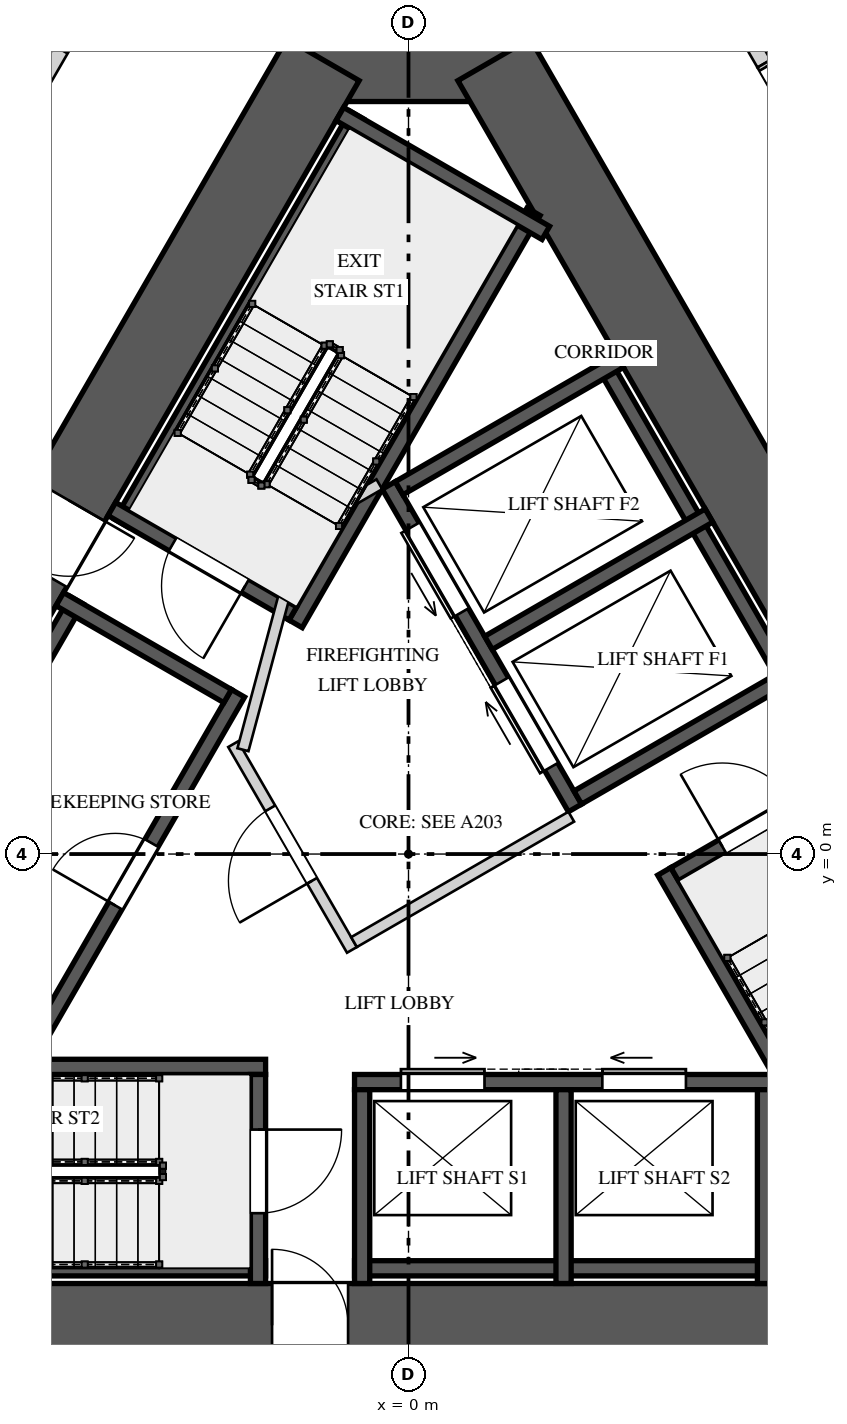
"""IFC4 building model, lengths in metres.
Left out: names, types, materials, properties, quantities, classifications, styles, units other than length and angle.
Written with IfcOpenShell. Run it as: python <this file> out.ifc"""

import sys

from ifc_helpers import new_model, si_unit, direction, frame, frame_2d, origin, place, context, subcontext, project, spatial, polyline, rectangle, outline, extrude, element, fill, save


model = new_model("IFC4")
c1 = context("Model", 3, precision=1e-05, world=origin(), true_north=direction((0.0, 1.0)))
c2 = subcontext(c1, "Body", "Model", "MODEL_VIEW")
j1 = project(units=[si_unit("LENGTHUNIT", "METRE"), si_unit("PLANEANGLEUNIT", "RADIAN")], contexts=[c1])
p1 = place(None, origin())
s1 = spatial("IfcSite", under=j1, at=p1, CompositionType="ELEMENT")
p2 = place(p1, origin())
s2 = spatial("IfcBuilding", under=s1, at=p2, CompositionType="ELEMENT")
p3 = place(p2, frame((0.0, 0.0, 10.0)))
s3 = spatial("IfcBuildingStorey", under=s2, at=p3, CompositionType="ELEMENT", Elevation=10.0)
p4 = place(p3, frame((1.443, 10.45, 0.0), z_axis=(0.0, 0.0, 1.0), x_axis=(-1.0, 0.0, 0.0)))
e1 = element("IfcWall", 1, at=p4, inside=s3, PredefinedType="SHEAR", context=c2, shape_type="SweptSolid", body=[
    extrude(rectangle(XDim=2.887, YDim=1.1, at=frame_2d((1.443, 0.0))), origin(), (0.0, 0.0, 1.0), 5.0),
])
p5 = place(p3, frame((-1.126, 10.45, 0.0), z_axis=(0.0, 0.0, 1.0), x_axis=(-0.500001757713, -0.866024388966, 0.0)))
e2 = element("IfcWall", 2, at=p5, inside=s3, PredefinedType="SHEAR", context=c2, shape_type="SweptSolid", body=[
    extrude(rectangle(XDim=16.974, YDim=1.1, at=frame_2d((8.487, 0.0))), origin(), (0.0, 0.0, 1.0), 5.0),
])
p6 = place(p5, frame((6.692, 0.0, 0.0)))
e3 = element("IfcOpeningElement", 3, at=p6, cuts=e2, PredefinedType="OPENING", context=c2, shape_type="SweptSolid", body=[
    extrude(rectangle(XDim=1.0, YDim=2.4, at=frame_2d((0.5, 1.2))), frame((0.0, 0.56, 0.0), z_axis=(0.0, -1.0, 0.0), x_axis=(1.0, 0.0, 0.0)), (0.0, 0.0, 1.0), 1.12),
])
p7 = place(p5, frame((14.397, 0.0, 0.0)))
e4 = element("IfcOpeningElement", 4, at=p7, cuts=e2, PredefinedType="OPENING", context=c2, shape_type="SweptSolid", body=[
    extrude(rectangle(XDim=0.8, YDim=2.1, at=frame_2d((0.4, 1.05))), frame((0.0, 0.56, 0.0), z_axis=(0.0, -1.0, 0.0), x_axis=(1.0, 0.0, 0.0)), (0.0, 0.0, 1.0), 1.12),
])
p8 = place(p3, frame((-8.487, -6.2, 0.0), z_axis=(0.0, 0.0, 1.0), x_axis=(1.0, 0.0, 0.0)))
e5 = element("IfcWall", 5, at=p8, inside=s3, PredefinedType="SHEAR", context=c2, shape_type="SweptSolid", body=[
    extrude(rectangle(XDim=16.974, YDim=1.1, at=frame_2d((8.487, 0.0))), origin(), (0.0, 0.0, 1.0), 5.0),
])
p9 = place(p8, frame((6.692, 0.0, 0.0)))
e6 = element("IfcOpeningElement", 6, at=p9, cuts=e5, PredefinedType="OPENING", context=c2, shape_type="SweptSolid", body=[
    extrude(rectangle(XDim=1.0, YDim=2.4, at=frame_2d((0.5, 1.2))), frame((0.0, 0.56, 0.0), z_axis=(0.0, -1.0, 0.0), x_axis=(1.0, 0.0, 0.0)), (0.0, 0.0, 1.0), 1.12),
])
p10 = place(p3, frame((9.613, -4.25, 0.0), z_axis=(0.0, 0.0, 1.0), x_axis=(-0.500001757713, 0.866024388966, 0.0)))
e7 = element("IfcWall", 7, at=p10, inside=s3, PredefinedType="SHEAR", context=c2, shape_type="SweptSolid", body=[
    extrude(rectangle(XDim=16.974, YDim=1.1, at=frame_2d((8.487, 0.0))), origin(), (0.0, 0.0, 1.0), 5.0),
])
p11 = place(p10, frame((6.762, 0.0, 0.0)))
e8 = element("IfcOpeningElement", 8, at=p11, cuts=e7, PredefinedType="OPENING", context=c2, shape_type="SweptSolid", body=[
    extrude(rectangle(XDim=1.0, YDim=2.4, at=frame_2d((0.5, 1.2))), frame((0.0, 0.56, 0.0), z_axis=(0.0, -1.0, 0.0), x_axis=(1.0, 0.0, 0.0)), (0.0, 0.0, 1.0), 1.12),
])
p12 = place(p3, frame((-0.68, 9.722, 0.0), z_axis=(0.0, 0.0, 1.0), x_axis=(-0.49998037582, -0.866036733513, 0.0)))
e9 = element("IfcWall", 9, at=p12, inside=s3, PredefinedType="SOLIDWALL", context=c2, shape_type="SweptSolid", body=[
    extrude(rectangle(XDim=6.2, YDim=0.2, at=frame_2d((3.1, 0.0))), origin(), (0.0, 0.0, 1.0), 4.65),
])
p13 = place(p3, frame((1.646, 8.45, 0.0), z_axis=(0.0, 0.0, 1.0), x_axis=(-0.500006002103, -0.866021938441, 0.0)))
e10 = element("IfcWall", 10, at=p13, inside=s3, PredefinedType="SOLIDWALL", context=c2, shape_type="SweptSolid", body=[
    extrude(rectangle(XDim=6.261, YDim=0.2, at=frame_2d((3.13, 0.0))), origin(), (0.0, 0.0, 1.0), 4.65),
])
p14 = place(p3, frame((1.806, 8.172, 0.0), z_axis=(0.0, 0.0, 1.0), x_axis=(-0.866054327916, 0.499949898588, 0.0)))
e11 = element("IfcWall", 11, at=p14, inside=s3, PredefinedType="SOLIDWALL", context=c2, shape_type="SweptSolid", body=[
    extrude(rectangle(XDim=3.128, YDim=0.2, at=frame_2d((1.564, 0.0))), origin(), (0.0, 0.0, 1.0), 4.65),
])
p15 = place(p3, frame((-1.521, 3.165, 0.0), z_axis=(0.0, 0.0, 1.0), x_axis=(-0.866027397988, 0.499996545922, 0.0)))
e12 = element("IfcWall", 12, at=p15, inside=s3, PredefinedType="SOLIDWALL", context=c2, shape_type="SweptSolid", body=[
    extrude(rectangle(XDim=2.75, YDim=0.2, at=frame_2d((1.375, 0.0))), origin(), (0.0, 0.0, 1.0), 4.65),
])
p16 = place(p15, frame((0.725, 0.0, 0.0)))
e13 = element("IfcOpeningElement", 13, at=p16, cuts=e12, PredefinedType="OPENING", context=c2, shape_type="SweptSolid", body=[
    extrude(rectangle(XDim=1.1, YDim=2.4, at=frame_2d((0.55, 1.2))), frame((0.0, 0.11, 0.0), z_axis=(0.0, -1.0, 0.0), x_axis=(1.0, 0.0, 0.0)), (0.0, 0.0, 1.0), 0.22),
])
p17 = place(p3, frame((-8.08, -5.45, 0.0), z_axis=(0.0, 0.0, 1.0), x_axis=(1.0, 0.0, 0.0)))
e14 = element("IfcWall", 14, at=p17, inside=s3, PredefinedType="SOLIDWALL", context=c2, shape_type="SweptSolid", body=[
    extrude(rectangle(XDim=6.2, YDim=0.2, at=frame_2d((3.1, 0.0))), origin(), (0.0, 0.0, 1.0), 4.65),
])
p18 = place(p3, frame((-8.141, -2.8, 0.0), z_axis=(0.0, 0.0, 1.0), x_axis=(1.0, 0.0, 0.0)))
e15 = element("IfcWall", 15, at=p18, inside=s3, PredefinedType="SOLIDWALL", context=c2, shape_type="SweptSolid", body=[
    extrude(rectangle(XDim=6.261, YDim=0.2, at=frame_2d((3.13, 0.0))), origin(), (0.0, 0.0, 1.0), 4.65),
])
p19 = place(p3, frame((-1.98, -2.9, 0.0), z_axis=(0.0, 0.0, 1.0), x_axis=(0.0, -1.0, 0.0)))
e16 = element("IfcWall", 16, at=p19, inside=s3, PredefinedType="SOLIDWALL", context=c2, shape_type="SweptSolid", body=[
    extrude(rectangle(XDim=2.75, YDim=0.2, at=frame_2d((1.375, 0.0))), origin(), (0.0, 0.0, 1.0), 4.65),
])
p20 = place(p19, frame((0.725, 0.0, 0.0)))
e17 = element("IfcOpeningElement", 17, at=p20, cuts=e16, PredefinedType="OPENING", context=c2, shape_type="SweptSolid", body=[
    extrude(rectangle(XDim=1.1, YDim=2.4, at=frame_2d((0.55, 1.2))), frame((0.0, 0.11, 0.0), z_axis=(0.0, -1.0, 0.0), x_axis=(1.0, 0.0, 0.0)), (0.0, 0.0, 1.0), 0.22),
])
p21 = place(p3, frame((6.495, -5.65, 0.0), z_axis=(0.0, 0.0, 1.0), x_axis=(-0.499976754523, 0.866038824151, 0.0)))
e18 = element("IfcWall", 18, at=p21, inside=s3, PredefinedType="SOLIDWALL", context=c2, shape_type="SweptSolid", body=[
    extrude(rectangle(XDim=6.26, YDim=0.2, at=frame_2d((3.13, 0.0))), origin(), (0.0, 0.0, 1.0), 4.65),
])
p22 = place(p3, frame((3.501, -0.265, 0.0), z_axis=(0.0, 0.0, 1.0), x_axis=(0.866027397988, 0.499996545922, 0.0)))
e19 = element("IfcWall", 19, at=p22, inside=s3, PredefinedType="SOLIDWALL", context=c2, shape_type="SweptSolid", body=[
    extrude(rectangle(XDim=2.75, YDim=0.2, at=frame_2d((1.375, 0.0))), origin(), (0.0, 0.0, 1.0), 4.65),
])
p23 = place(p22, frame((0.725, 0.0, 0.0)))
e20 = element("IfcOpeningElement", 20, at=p23, cuts=e19, PredefinedType="OPENING", context=c2, shape_type="SweptSolid", body=[
    extrude(rectangle(XDim=1.1, YDim=2.4, at=frame_2d((0.55, 1.2))), frame((0.0, 0.11, 0.0), z_axis=(0.0, -1.0, 0.0), x_axis=(1.0, 0.0, 0.0)), (0.0, 0.0, 1.0), 0.22),
])
p24 = place(p3, frame((-4.993, -2.648, 0.0), z_axis=(0.0, 0.0, 1.0), x_axis=(0.499996545922, 0.866027397988, 0.0)))
e21 = element("IfcWall", 21, at=p24, inside=s3, PredefinedType="SOLIDWALL", context=c2, shape_type="SweptSolid", body=[
    extrude(rectangle(XDim=5.5, YDim=0.2, at=frame_2d((2.75, 0.0))), origin(), (0.0, 0.0, 1.0), 4.65),
])
p25 = place(p24, frame((2.275, 0.0, 0.0)))
e22 = element("IfcOpeningElement", 22, at=p25, cuts=e21, PredefinedType="OPENING", context=c2, shape_type="SweptSolid", body=[
    extrude(rectangle(XDim=0.95, YDim=2.4, at=frame_2d((0.475, 1.2))), frame((0.0, 0.11, 0.0), z_axis=(0.0, -1.0, 0.0), x_axis=(1.0, 0.0, 0.0)), (0.0, 0.0, 1.0), 0.22),
])
p26 = place(p3, frame((-4.365, 3.34, 0.0), z_axis=(0.0, 0.0, 1.0), x_axis=(-0.499996545922, -0.866027397988, 0.0)))
e23 = element("IfcWall", 23, at=p26, inside=s3, PredefinedType="SOLIDWALL", context=c2, shape_type="SweptSolid", body=[
    extrude(rectangle(XDim=5.5, YDim=0.2, at=frame_2d((2.75, 0.0))), origin(), (0.0, 0.0, 1.0), 4.65),
])
p27 = place(p3, frame((-2.38, 2.078, 0.0), z_axis=(0.0, 0.0, 1.0), x_axis=(-0.866054858364, 0.499948979701, 0.0)))
e24 = element("IfcWall", 24, at=p27, inside=s3, PredefinedType="SOLIDWALL", context=c2, shape_type="SweptSolid", body=[
    extrude(rectangle(XDim=2.55, YDim=0.2, at=frame_2d((1.275, 0.0))), origin(), (0.0, 0.0, 1.0), 4.65),
])
p28 = place(p3, frame((-0.71, -3.0, 0.0), z_axis=(0.0, 0.0, 1.0), x_axis=(1.0, 0.0, 0.0)))
e25 = element("IfcWall", 25, at=p28, inside=s3, PredefinedType="SOLIDWALL", context=c2, shape_type="SweptSolid", body=[
    extrude(rectangle(XDim=5.5, YDim=0.2, at=frame_2d((2.75, 0.0))), origin(), (0.0, 0.0, 1.0), 4.65),
])
p29 = place(p28, frame((0.61, 0.0, 0.0)))
e26 = element("IfcOpeningElement", 26, at=p29, cuts=e25, PredefinedType="OPENING", context=c2, shape_type="SweptSolid", body=[
    extrude(rectangle(XDim=1.1, YDim=2.1, at=frame_2d((0.55, 1.05))), frame((0.0, 0.11, 0.0), z_axis=(0.0, -1.0, 0.0), x_axis=(1.0, 0.0, 0.0)), (0.0, 0.0, 1.0), 0.22),
])
p30 = place(p28, frame((3.26, 0.0, 0.0)))
e27 = element("IfcOpeningElement", 27, at=p30, cuts=e25, PredefinedType="OPENING", context=c2, shape_type="SweptSolid", body=[
    extrude(rectangle(XDim=1.1, YDim=2.1, at=frame_2d((0.55, 1.05))), frame((0.0, 0.11, 0.0), z_axis=(0.0, -1.0, 0.0), x_axis=(1.0, 0.0, 0.0)), (0.0, 0.0, 1.0), 0.22),
])
p31 = place(p3, frame((-0.71, -5.45, 0.0), z_axis=(0.0, 0.0, 1.0), x_axis=(1.0, 0.0, 0.0)))
e28 = element("IfcWall", 28, at=p31, inside=s3, PredefinedType="SOLIDWALL", context=c2, shape_type="SweptSolid", body=[
    extrude(rectangle(XDim=5.5, YDim=0.2, at=frame_2d((2.75, 0.0))), origin(), (0.0, 0.0, 1.0), 4.65),
])
for number, where, z_axis, x_axis in (
    (29, (-0.61, -3.1, 0.0), (0.0, 0.0, 1.0), (0.0, -1.0, 0.0)),
    (30, (2.04, -3.1, 0.0), (0.0, 0.0, 1.0), (0.0, -1.0, 0.0)),
    (31, (4.69, -3.1, 0.0), (0.0, 0.0, 1.0), (0.0, -1.0, 0.0)),
):
    element("IfcWall", number, at=place(p3, frame(where, z_axis=z_axis, x_axis=x_axis)), inside=s3, PredefinedType="SOLIDWALL", context=c2, shape_type="SweptSolid", body=[
        extrude(rectangle(XDim=2.55, YDim=0.2, at=frame_2d((1.275, 0.0))), origin(), (0.0, 0.0, 1.0), 4.65),
    ])
p32 = place(p3, frame((2.19, 0.606, 0.0), z_axis=(0.0, 0.0, 1.0), x_axis=(-0.500002801628, 0.866023786258, 0.0)))
e32 = element("IfcWall", 32, at=p32, inside=s3, PredefinedType="SOLIDWALL", context=c2, shape_type="SweptSolid", body=[
    extrude(rectangle(XDim=4.9, YDim=0.2, at=frame_2d((2.45, 0.0))), origin(), (0.0, 0.0, 1.0), 4.65),
])
p33 = place(p32, frame((0.625, 0.0, 0.0)))
e33 = element("IfcOpeningElement", 33, at=p33, cuts=e32, PredefinedType="OPENING", context=c2, shape_type="SweptSolid", body=[
    extrude(rectangle(XDim=1.3, YDim=2.1, at=frame_2d((0.65, 1.05))), frame((0.0, 0.11, 0.0), z_axis=(0.0, -1.0, 0.0), x_axis=(1.0, 0.0, 0.0)), (0.0, 0.0, 1.0), 0.22),
])
p34 = place(p32, frame((2.975, 0.0, 0.0)))
e34 = element("IfcOpeningElement", 34, at=p34, cuts=e32, PredefinedType="OPENING", context=c2, shape_type="SweptSolid", body=[
    extrude(rectangle(XDim=1.3, YDim=2.1, at=frame_2d((0.65, 1.05))), frame((0.0, 0.11, 0.0), z_axis=(0.0, -1.0, 0.0), x_axis=(1.0, 0.0, 0.0)), (0.0, 0.0, 1.0), 0.22),
])
p35 = place(p3, frame((5.005, 2.231, 0.0), z_axis=(0.0, 0.0, 1.0), x_axis=(-0.500002801628, 0.866023786258, 0.0)))
e35 = element("IfcWall", 35, at=p35, inside=s3, PredefinedType="SOLIDWALL", context=c2, shape_type="SweptSolid", body=[
    extrude(rectangle(XDim=4.9, YDim=0.2, at=frame_2d((2.45, 0.0))), origin(), (0.0, 0.0, 1.0), 4.65),
])
p36 = place(p3, frame((2.227, 0.743, 0.0), z_axis=(0.0, 0.0, 1.0), x_axis=(0.866014461049, 0.500018952895, 0.0)))
e36 = element("IfcWall", 36, at=p36, inside=s3, PredefinedType="SOLIDWALL", context=c2, shape_type="SweptSolid", body=[
    extrude(rectangle(XDim=3.35, YDim=0.2, at=frame_2d((1.675, 0.0))), origin(), (0.0, 0.0, 1.0), 4.65),
])
p37 = place(p3, frame((1.052, 2.778, 0.0), z_axis=(0.0, 0.0, 1.0), x_axis=(0.866032680314, 0.499987396469, 0.0)))
e37 = element("IfcWall", 37, at=p37, inside=s3, PredefinedType="SOLIDWALL", context=c2, shape_type="SweptSolid", body=[
    extrude(rectangle(XDim=3.35, YDim=0.2, at=frame_2d((1.675, 0.0))), origin(), (0.0, 0.0, 1.0), 4.65),
])
p38 = place(p3, frame((-0.123, 4.813, 0.0), z_axis=(0.0, 0.0, 1.0), x_axis=(0.866014461049, 0.500018952895, 0.0)))
e38 = element("IfcWall", 38, at=p38, inside=s3, PredefinedType="SOLIDWALL", context=c2, shape_type="SweptSolid", body=[
    extrude(rectangle(XDim=3.35, YDim=0.2, at=frame_2d((1.675, 0.0))), origin(), (0.0, 0.0, 1.0), 4.65),
])
p39 = place(p3, frame((-0.744, -1.261, 0.0), z_axis=(0.0, 0.0, 1.0), x_axis=(-0.500004234368, 0.866022959057, 0.0)))
e39 = element("IfcWall", 39, at=p39, inside=s3, PredefinedType="PARTITIONING", context=c2, shape_type="SweptSolid", body=[
    extrude(rectangle(XDim=3.125, YDim=0.15, at=frame_2d((1.562, 0.0))), origin(), (0.0, 0.0, 1.0), 4.65),
])
p40 = place(p39, frame((1.05, 0.0, 0.0)))
e40 = element("IfcOpeningElement", 40, at=p40, cuts=e39, PredefinedType="OPENING", context=c2, shape_type="SweptSolid", body=[
    extrude(rectangle(XDim=1.1, YDim=2.4, at=frame_2d((0.55, 1.2))), frame((0.0, 0.085, 0.0), z_axis=(0.0, -1.0, 0.0), x_axis=(1.0, 0.0, 0.0)), (0.0, 0.0, 1.0), 0.17),
])
p41 = place(p3, frame((-0.717, -1.159, 0.0), z_axis=(0.0, 0.0, 1.0), x_axis=(0.866008176907, 0.50002983664, 0.0)))
e41 = element("IfcWall", 41, at=p41, inside=s3, PredefinedType="PARTITIONING", context=c2, shape_type="SweptSolid", body=[
    extrude(rectangle(XDim=3.3, YDim=0.15, at=frame_2d((1.65, 0.0))), origin(), (0.0, 0.0, 1.0), 4.65),
])
p42 = place(p3, frame((-2.178, 1.372, 0.0), z_axis=(0.0, 0.0, 1.0), x_axis=(0.258808958833, 0.96592852884, 0.0)))
e42 = element("IfcWall", 42, at=p42, inside=s3, PredefinedType="PARTITIONING", context=c2, shape_type="SweptSolid", body=[
    extrude(rectangle(XDim=2.903, YDim=0.15, at=frame_2d((1.451, 0.0))), origin(), (0.0, 0.0, 1.0), 4.65),
])
p43 = place(p3, frame((-1.51, 4.215, 0.0), z_axis=(0.0, 0.0, 1.0), x_axis=(0.866085525409, 0.49989585183, 0.0)))
e43 = element("IfcWall", 43, at=p43, inside=s3, PredefinedType="PARTITIONING", context=c2, shape_type="SweptSolid", body=[
    extrude(rectangle(XDim=1.3, YDim=0.15, at=frame_2d((0.65, 0.0))), origin(), (0.0, 0.0, 1.0), 4.65),
])
p44 = place(p3, frame((3.404, 12.604, 0.0), z_axis=(0.0, 0.0, 1.0), x_axis=(0.50004602983, -0.865998826819, 0.0)))
e44 = element("IfcWall", 44, at=p44, inside=s3, PredefinedType="SOLIDWALL", context=c2, shape_type="SweptSolid", body=[
    extrude(rectangle(XDim=2.547, YDim=0.2, at=frame_2d((1.273, 0.0))), origin(), (0.0, 0.0, 1.0), 4.65),
])
p45 = place(p3, frame((4.678, 10.398, 0.0), z_axis=(0.0, 0.0, 1.0), x_axis=(0.500040506767, -0.866002015928, 0.0)))
e45 = element("IfcWall", 45, at=p45, inside=s3, PredefinedType="SOLIDWALL", context=c2, shape_type="SweptSolid", body=[
    extrude(outline(polyline([(0.0, 0.0), (1.218, 0.0), (1.218, 3.75), (0.268, 3.75), (0.268, 4.65), (0.0, 4.65), (0.0, 0.0)])), frame((0.0, 0.1, 0.0), z_axis=(0.0, -1.0, 0.0), x_axis=(1.0, 0.0, 0.0)), (0.0, 0.0, 1.0), 0.2),
])
p46 = place(p45, frame((0.05, 0.0, 0.0)))
e46 = element("IfcOpeningElement", 46, at=p46, cuts=e45, PredefinedType="OPENING", context=c2, shape_type="SweptSolid", body=[
    extrude(rectangle(XDim=1.1, YDim=2.4, at=frame_2d((0.55, 1.2))), frame((0.0, 0.11, 0.0), z_axis=(0.0, -1.0, 0.0), x_axis=(1.0, 0.0, 0.0)), (0.0, 0.0, 1.0), 0.22),
])
p47 = place(p3, frame((-4.812, 10.165, 0.0), z_axis=(0.0, 0.0, 1.0), x_axis=(0.500000186108, 0.866025296335, 0.0)))
e47 = element("IfcWall", 47, at=p47, inside=s3, PredefinedType="SOLIDWALL", context=c2, shape_type="SweptSolid", body=[
    extrude(rectangle(XDim=2.815, YDim=0.2, at=frame_2d((1.408, 0.0))), origin(), (0.0, 0.0, 1.0), 4.65),
])
p48 = place(p47, frame((0.482, 0.0, 0.0)))
e48 = element("IfcOpeningElement", 48, at=p48, cuts=e47, PredefinedType="OPENING", context=c2, shape_type="SweptSolid", body=[
    extrude(rectangle(XDim=1.1, YDim=2.4, at=frame_2d((0.55, 1.2))), frame((0.0, 0.11, 0.0), z_axis=(0.0, -1.0, 0.0), x_axis=(1.0, 0.0, 0.0)), (0.0, 0.0, 1.0), 0.22),
])
p49 = place(p16, origin())
e49 = element("IfcDoor", 49, at=p49, inside=s3, OperationType="SINGLE_SWING_RIGHT", PredefinedType="DOOR", context=c2, shape_type="SweptSolid", body=[
    extrude(rectangle(XDim=1.1, YDim=2.4, at=frame_2d((0.55, 1.2))), frame((0.0, 0.025, 0.0), z_axis=(0.0, -1.0, 0.0), x_axis=(1.0, 0.0, 0.0)), (0.0, 0.0, 1.0), 0.05),
])
fill(e13, e49)
p50 = place(p20, origin())
e50 = element("IfcDoor", 50, at=p50, inside=s3, OperationType="SINGLE_SWING_LEFT", PredefinedType="DOOR", context=c2, shape_type="SweptSolid", body=[
    extrude(rectangle(XDim=1.1, YDim=2.4, at=frame_2d((0.55, 1.2))), frame((0.0, 0.025, 0.0), z_axis=(0.0, -1.0, 0.0), x_axis=(1.0, 0.0, 0.0)), (0.0, 0.0, 1.0), 0.05),
])
fill(e17, e50)
p51 = place(p23, origin())
e51 = element("IfcDoor", 51, at=p51, inside=s3, OperationType="SINGLE_SWING_RIGHT", PredefinedType="DOOR", context=c2, shape_type="SweptSolid", body=[
    extrude(rectangle(XDim=1.1, YDim=2.4, at=frame_2d((0.55, 1.2))), frame((0.0, 0.025, 0.0), z_axis=(0.0, -1.0, 0.0), x_axis=(1.0, 0.0, 0.0)), (0.0, 0.0, 1.0), 0.05),
])
fill(e20, e51)
p52 = place(p25, origin())
e52 = element("IfcDoor", 52, at=p52, inside=s3, OperationType="SINGLE_SWING_LEFT", PredefinedType="DOOR", context=c2, shape_type="SweptSolid", body=[
    extrude(rectangle(XDim=0.95, YDim=2.4, at=frame_2d((0.475, 1.2))), frame((0.0, 0.025, 0.0), z_axis=(0.0, -1.0, 0.0), x_axis=(1.0, 0.0, 0.0)), (0.0, 0.0, 1.0), 0.05),
])
fill(e22, e52)
p53 = place(p29, origin())
e53 = element("IfcDoor", 53, at=p53, inside=s3, OperationType="SLIDING_TO_RIGHT", PredefinedType="DOOR", context=c2, shape_type="SweptSolid", body=[
    extrude(rectangle(XDim=1.1, YDim=2.1, at=frame_2d((0.55, 1.05))), frame((0.0, 0.025, 0.0), z_axis=(0.0, -1.0, 0.0), x_axis=(1.0, 0.0, 0.0)), (0.0, 0.0, 1.0), 0.05),
])
fill(e26, e53)
p54 = place(p30, origin())
e54 = element("IfcDoor", 54, at=p54, inside=s3, OperationType="SLIDING_TO_LEFT", PredefinedType="DOOR", context=c2, shape_type="SweptSolid", body=[
    extrude(rectangle(XDim=1.1, YDim=2.1, at=frame_2d((0.55, 1.05))), frame((0.0, 0.025, 0.0), z_axis=(0.0, -1.0, 0.0), x_axis=(1.0, 0.0, 0.0)), (0.0, 0.0, 1.0), 0.05),
])
fill(e27, e54)
p55 = place(p33, origin())
e55 = element("IfcDoor", 55, at=p55, inside=s3, OperationType="SLIDING_TO_RIGHT", PredefinedType="DOOR", context=c2, shape_type="SweptSolid", body=[
    extrude(rectangle(XDim=1.3, YDim=2.1, at=frame_2d((0.65, 1.05))), frame((0.0, 0.025, 0.0), z_axis=(0.0, -1.0, 0.0), x_axis=(1.0, 0.0, 0.0)), (0.0, 0.0, 1.0), 0.05),
])
fill(e33, e55)
p56 = place(p34, origin())
e56 = element("IfcDoor", 56, at=p56, inside=s3, OperationType="SLIDING_TO_LEFT", PredefinedType="DOOR", context=c2, shape_type="SweptSolid", body=[
    extrude(rectangle(XDim=1.3, YDim=2.1, at=frame_2d((0.65, 1.05))), frame((0.0, 0.025, 0.0), z_axis=(0.0, -1.0, 0.0), x_axis=(1.0, 0.0, 0.0)), (0.0, 0.0, 1.0), 0.05),
])
fill(e34, e56)
p57 = place(p40, origin())
e57 = element("IfcDoor", 57, at=p57, inside=s3, OperationType="SINGLE_SWING_RIGHT", PredefinedType="DOOR", context=c2, shape_type="SweptSolid", body=[
    extrude(rectangle(XDim=1.1, YDim=2.4, at=frame_2d((0.55, 1.2))), frame((0.0, 0.025, 0.0), z_axis=(0.0, -1.0, 0.0), x_axis=(1.0, 0.0, 0.0)), (0.0, 0.0, 1.0), 0.05),
])
fill(e40, e57)
p58 = place(p6, origin())
e58 = element("IfcDoor", 58, at=p58, inside=s3, OperationType="SINGLE_SWING_LEFT", PredefinedType="DOOR", context=c2, shape_type="SweptSolid", body=[
    extrude(rectangle(XDim=1.0, YDim=2.4, at=frame_2d((0.5, 1.2))), frame((0.0, 0.025, 0.0), z_axis=(0.0, -1.0, 0.0), x_axis=(1.0, 0.0, 0.0)), (0.0, 0.0, 1.0), 0.05),
])
fill(e3, e58)
p59 = place(p9, origin())
e59 = element("IfcDoor", 59, at=p59, inside=s3, OperationType="SINGLE_SWING_RIGHT", PredefinedType="DOOR", context=c2, shape_type="SweptSolid", body=[
    extrude(rectangle(XDim=1.0, YDim=2.4, at=frame_2d((0.5, 1.2))), frame((0.0, 0.025, 0.0), z_axis=(0.0, -1.0, 0.0), x_axis=(1.0, 0.0, 0.0)), (0.0, 0.0, 1.0), 0.05),
])
fill(e6, e59)
p60 = place(p46, origin())
e60 = element("IfcDoor", 60, at=p60, inside=s3, OperationType="SINGLE_SWING_LEFT", PredefinedType="DOOR", context=c2, shape_type="SweptSolid", body=[
    extrude(rectangle(XDim=1.1, YDim=2.4, at=frame_2d((0.55, 1.2))), frame((0.0, 0.025, 0.0), z_axis=(0.0, -1.0, 0.0), x_axis=(1.0, 0.0, 0.0)), (0.0, 0.0, 1.0), 0.05),
])
fill(e46, e60)
save(model, sys.argv[1])
